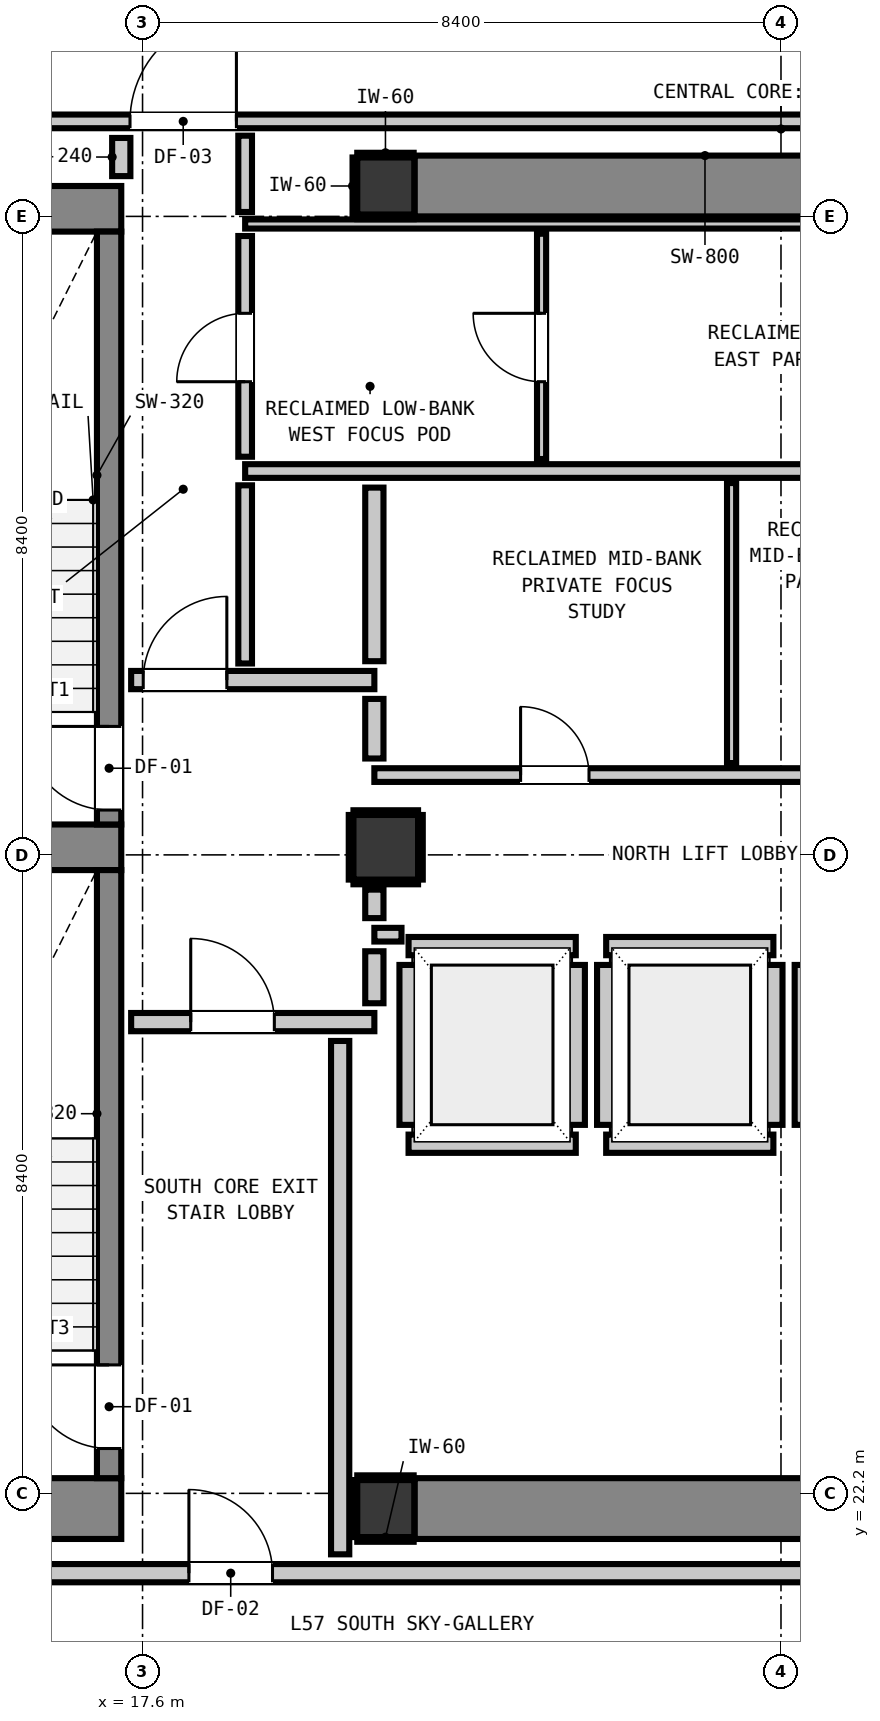
"""IFC4 building model, lengths in metres.
Left out: names, types, materials, properties, quantities, classifications, styles, units other than length and angle.
Written with IfcOpenShell. Run it as: python <this file> out.ifc"""

import sys

from ifc_helpers import new_model, si_unit, direction, frame, frame_2d, origin, origin_2d, place, context, subcontext, project, spatial, rectangle, extrude, element, fill, save


model = new_model("IFC4")
c1 = context("Model", 3, precision=1e-05, world=origin(), true_north=direction((0.0, 1.0)))
c2 = subcontext(c1, "Body", "Model", "MODEL_VIEW")
j1 = project(units=[si_unit("LENGTHUNIT", "METRE"), si_unit("PLANEANGLEUNIT", "RADIAN")], contexts=[c1])
p1 = place(None, origin())
s1 = spatial("IfcSite", under=j1, at=p1, CompositionType="ELEMENT")
p2 = place(p1, origin())
s2 = spatial("IfcBuilding", under=s1, at=p2, CompositionType="ELEMENT")
p3 = place(p2, frame((0.0, 0.0, 196.8)))
s3 = spatial("IfcBuildingStorey", under=s2, at=p3, CompositionType="ELEMENT", Elevation=196.8)
for number, where, z_axis, x_axis in (
    (1, (20.8, 22.0, 0.0), (0.0, 0.0, 1.0), (1.0, 0.0, 0.0)),
    (2, (20.8, 39.4, 0.0), (0.0, 0.0, 1.0), (1.0, 0.0, 0.0)),
):
    element("IfcColumn", number, at=place(p3, frame(where, z_axis=z_axis, x_axis=x_axis)), inside=s3, PredefinedType="COLUMN", context=c2, shape_type="SweptSolid", body=[
        extrude(rectangle(XDim=0.75, YDim=0.75, at=origin_2d()), origin(), (0.0, 0.0, 1.0), 3.32),
    ])
p4 = place(p3, frame((13.24, 22.0, 0.0), z_axis=(0.0, 0.0, 1.0), x_axis=(1.0, 0.0, 0.0)))
e3 = element("IfcWall", 3, at=p4, inside=s3, PredefinedType="SHEAR", context=c2, shape_type="SweptSolid", body=[
    extrude(rectangle(XDim=4.08, YDim=0.8, at=frame_2d((2.04, 0.0))), origin(), (0.0, 0.0, 1.0), 3.32),
])
p5 = place(p3, frame((13.24, 39.1, 0.0), z_axis=(0.0, 0.0, 1.0), x_axis=(1.0, 0.0, 0.0)))
e4 = element("IfcWall", 4, at=p5, inside=s3, PredefinedType="SHEAR", context=c2, shape_type="SweptSolid", body=[
    extrude(rectangle(XDim=4.08, YDim=0.6, at=frame_2d((2.04, 0.0))), origin(), (0.0, 0.0, 1.0), 3.32),
])
p6 = place(p3, frame((13.78, 30.7, 0.0), z_axis=(0.0, 0.0, 1.0), x_axis=(1.0, 0.0, 0.0)))
e5 = element("IfcWall", 5, at=p6, inside=s3, PredefinedType="SHEAR", context=c2, shape_type="SweptSolid", body=[
    extrude(rectangle(XDim=3.54, YDim=0.6, at=frame_2d((1.77, 0.0))), origin(), (0.0, 0.0, 1.0), 3.32),
])
for number, where, z_axis, x_axis in (
    (6, (21.18, 22.0, 0.0), (0.0, 0.0, 1.0), (1.0, 0.0, 0.0)),
    (7, (21.18, 39.4, 0.0), (0.0, 0.0, 1.0), (1.0, 0.0, 0.0)),
):
    element("IfcWall", number, at=place(p3, frame(where, z_axis=z_axis, x_axis=x_axis)), inside=s3, PredefinedType="SHEAR", context=c2, shape_type="SweptSolid", body=[
        extrude(rectangle(XDim=7.64, YDim=0.8, at=frame_2d((3.82, 0.0))), origin(), (0.0, 0.0, 1.0), 3.32),
    ])
p7 = place(p3, frame((17.16, 31.0, 0.0), z_axis=(0.0, 0.0, 1.0), x_axis=(0.0, 1.0, 0.0)))
e8 = element("IfcWall", 8, at=p7, inside=s3, PredefinedType="SHEAR", context=c2, shape_type="SweptSolid", body=[
    extrude(rectangle(XDim=7.8, YDim=0.32, at=frame_2d((3.9, 0.0))), origin(), (0.0, 0.0, 1.0), 3.32),
])
p8 = place(p7, frame((0.19, 0.0, 0.0)))
e9 = element("IfcOpeningElement", 9, at=p8, cuts=e8, PredefinedType="OPENING", context=c2, shape_type="SweptSolid", body=[
    extrude(rectangle(XDim=1.1, YDim=2.15, at=frame_2d((0.55, 1.075))), frame((0.0, 0.17, 0.0), z_axis=(0.0, -1.0, 0.0), x_axis=(1.0, 0.0, 0.0)), (0.0, 0.0, 1.0), 0.34),
])
p9 = place(p3, frame((17.16, 22.4, 0.0), z_axis=(0.0, 0.0, 1.0), x_axis=(0.0, 1.0, 0.0)))
e10 = element("IfcWall", 10, at=p9, inside=s3, PredefinedType="SHEAR", context=c2, shape_type="SweptSolid", body=[
    extrude(rectangle(XDim=8.0, YDim=0.32, at=frame_2d((4.0, 0.0))), origin(), (0.0, 0.0, 1.0), 3.32),
])
p10 = place(p9, frame((0.39, 0.0, 0.0)))
e11 = element("IfcOpeningElement", 11, at=p10, cuts=e10, PredefinedType="OPENING", context=c2, shape_type="SweptSolid", body=[
    extrude(rectangle(XDim=1.1, YDim=2.15, at=frame_2d((0.55, 1.075))), frame((0.0, 0.17, 0.0), z_axis=(0.0, -1.0, 0.0), x_axis=(1.0, 0.0, 0.0)), (0.0, 0.0, 1.0), 0.34),
])
p11 = place(p3, frame((20.8, 30.7, 0.0), z_axis=(0.0, 0.0, 1.0), x_axis=(1.0, 0.0, 0.0)))
e12 = element("IfcColumn", 12, at=p11, inside=s3, PredefinedType="COLUMN", context=c2, shape_type="SweptSolid", body=[
    extrude(rectangle(XDim=0.85, YDim=0.85, at=origin_2d()), origin(), (0.0, 0.0, 1.0), 3.32),
])
for number, where, z_axis, x_axis in (
    (13, (21.1, 26.8, 0.0), (0.0, 0.0, 1.0), (1.0, 0.0, 0.0)),
    (14, (21.1, 29.4, 0.0), (0.0, 0.0, 1.0), (1.0, 0.0, 0.0)),
):
    element("IfcWall", number, at=place(p3, frame(where, z_axis=z_axis, x_axis=x_axis)), inside=s3, PredefinedType="PARTITIONING", context=c2, shape_type="SweptSolid", body=[
        extrude(rectangle(XDim=2.2, YDim=0.24, at=frame_2d((1.1, 0.0))), origin(), (0.0, 0.0, 1.0), 3.1),
    ])
p12 = place(p3, frame((21.1, 27.048, 0.0), z_axis=(0.0, 0.0, 1.0), x_axis=(0.0, 1.0, 0.0)))
e15 = element("IfcWall", 15, at=p12, inside=s3, PredefinedType="PARTITIONING", context=c2, shape_type="SweptSolid", body=[
    extrude(rectangle(XDim=2.104, YDim=0.24, at=frame_2d((1.052, 0.0))), origin(), (0.0, 0.0, 1.0), 2.335),
])
p13 = place(p3, frame((23.3, 27.048, 0.0), z_axis=(0.0, 0.0, 1.0), x_axis=(0.0, 1.0, 0.0)))
e16 = element("IfcWall", 16, at=p13, inside=s3, PredefinedType="PARTITIONING", context=c2, shape_type="SweptSolid", body=[
    extrude(rectangle(XDim=2.104, YDim=0.24, at=frame_2d((1.052, 0.0))), origin(), (0.0, 0.0, 1.0), 3.1),
])
for number, where, z_axis, x_axis in (
    (17, (23.7, 26.8, 0.0), (0.0, 0.0, 1.0), (1.0, 0.0, 0.0)),
    (18, (23.7, 29.4, 0.0), (0.0, 0.0, 1.0), (1.0, 0.0, 0.0)),
):
    element("IfcWall", number, at=place(p3, frame(where, z_axis=z_axis, x_axis=x_axis)), inside=s3, PredefinedType="PARTITIONING", context=c2, shape_type="SweptSolid", body=[
        extrude(rectangle(XDim=2.2, YDim=0.24, at=frame_2d((1.1, 0.0))), origin(), (0.0, 0.0, 1.0), 3.1),
    ])
for number, where, z_axis, x_axis in (
    (19, (23.7, 27.048, 0.0), (0.0, 0.0, 1.0), (0.0, 1.0, 0.0)),
    (20, (25.9, 27.048, 0.0), (0.0, 0.0, 1.0), (0.0, 1.0, 0.0)),
    (21, (26.3, 27.048, 0.0), (0.0, 0.0, 1.0), (0.0, 1.0, 0.0)),
):
    element("IfcWall", number, at=place(p3, frame(where, z_axis=z_axis, x_axis=x_axis)), inside=s3, PredefinedType="PARTITIONING", context=c2, shape_type="SweptSolid", body=[
        extrude(rectangle(XDim=2.104, YDim=0.24, at=frame_2d((1.052, 0.0))), origin(), (0.0, 0.0, 1.0), 3.1),
    ])
p14 = place(p3, frame((4.587, 21.15, 0.0), z_axis=(0.0, 0.0, 1.0), x_axis=(1.0, 0.0, 0.0)))
e22 = element("IfcWall", 22, at=p14, inside=s3, PredefinedType="PARTITIONING", context=c2, shape_type="SweptSolid", body=[
    extrude(rectangle(XDim=36.626, YDim=0.24, at=frame_2d((18.313, 0.0))), origin(), (0.0, 0.0, 1.0), 3.1),
])
p15 = place(p14, frame((13.623, 0.0, 0.0)))
e23 = element("IfcOpeningElement", 23, at=p15, cuts=e22, PredefinedType="OPENING", context=c2, shape_type="SweptSolid", body=[
    extrude(rectangle(XDim=1.1, YDim=2.15, at=frame_2d((0.55, 1.075))), frame((0.0, 0.13, 0.0), z_axis=(0.0, -1.0, 0.0), x_axis=(1.0, 0.0, 0.0)), (0.0, 0.0, 1.0), 0.26),
])
p16 = place(p14, frame((4.723, 0.0, 0.0)))
e24 = element("IfcOpeningElement", 24, at=p16, cuts=e22, PredefinedType="OPENING", context=c2, shape_type="SweptSolid", body=[
    extrude(rectangle(XDim=1.0, YDim=2.15, at=frame_2d((0.5, 1.075))), frame((0.0, 0.13, 0.0), z_axis=(0.0, -1.0, 0.0), x_axis=(1.0, 0.0, 0.0)), (0.0, 0.0, 1.0), 0.26),
])
p17 = place(p3, frame((17.45, 28.4, 0.0), z_axis=(0.0, 0.0, 1.0), x_axis=(1.0, 0.0, 0.0)))
e25 = element("IfcWall", 25, at=p17, inside=s3, PredefinedType="PARTITIONING", context=c2, shape_type="SweptSolid", body=[
    extrude(rectangle(XDim=3.2, YDim=0.24, at=frame_2d((1.6, 0.0))), origin(), (0.0, 0.0, 1.0), 3.1),
])
p18 = place(p17, frame((0.784, 0.0, 0.0)))
e26 = element("IfcOpeningElement", 26, at=p18, cuts=e25, PredefinedType="OPENING", context=c2, shape_type="SweptSolid", body=[
    extrude(rectangle(XDim=1.1, YDim=2.15, at=frame_2d((0.55, 1.075))), frame((0.0, 0.13, 0.0), z_axis=(0.0, -1.0, 0.0), x_axis=(1.0, 0.0, 0.0)), (0.0, 0.0, 1.0), 0.26),
])
p19 = place(p3, frame((17.45, 32.9, 0.0), z_axis=(0.0, 0.0, 1.0), x_axis=(1.0, 0.0, 0.0)))
e27 = element("IfcWall", 27, at=p19, inside=s3, PredefinedType="PARTITIONING", context=c2, shape_type="SweptSolid", body=[
    extrude(rectangle(XDim=3.2, YDim=0.24, at=frame_2d((1.6, 0.0))), origin(), (0.0, 0.0, 1.0), 3.1),
])
p20 = place(p19, frame((0.159, 0.0, 0.0)))
e28 = element("IfcOpeningElement", 28, at=p20, cuts=e27, PredefinedType="OPENING", context=c2, shape_type="SweptSolid", body=[
    extrude(rectangle(XDim=1.1, YDim=2.15, at=frame_2d((0.55, 1.075))), frame((0.0, 0.13, 0.0), z_axis=(0.0, -1.0, 0.0), x_axis=(1.0, 0.0, 0.0)), (0.0, 0.0, 1.0), 0.26),
])
p21 = place(p3, frame((20.65, 29.55, 0.0), z_axis=(0.0, 0.0, 1.0), x_axis=(1.0, 0.0, 0.0)))
e29 = element("IfcWall", 29, at=p21, inside=s3, PredefinedType="PARTITIONING", context=c2, shape_type="SweptSolid", body=[
    extrude(rectangle(XDim=0.357, YDim=0.18, at=frame_2d((0.179, 0.0))), origin(), (0.0, 0.0, 1.0), 3.1),
])
p22 = place(p3, frame((20.65, 31.65, 0.0), z_axis=(0.0, 0.0, 1.0), x_axis=(1.0, 0.0, 0.0)))
e30 = element("IfcWall", 30, at=p22, inside=s3, PredefinedType="PARTITIONING", context=c2, shape_type="SweptSolid", body=[
    extrude(rectangle(XDim=7.7, YDim=0.18, at=frame_2d((3.85, 0.0))), origin(), (0.0, 0.0, 1.0), 3.1),
])
p23 = place(p22, frame((1.924, 0.0, 0.0)))
e31 = element("IfcOpeningElement", 31, at=p23, cuts=e30, PredefinedType="OPENING", context=c2, shape_type="SweptSolid", body=[
    extrude(rectangle(XDim=0.9, YDim=2.1, at=frame_2d((0.45, 1.05))), frame((0.0, 0.1, 0.0), z_axis=(0.0, -1.0, 0.0), x_axis=(1.0, 0.0, 0.0)), (0.0, 0.0, 1.0), 0.2),
])
p24 = place(p3, frame((18.95, 35.65, 0.0), z_axis=(0.0, 0.0, 1.0), x_axis=(1.0, 0.0, 0.0)))
e32 = element("IfcWall", 32, at=p24, inside=s3, PredefinedType="PARTITIONING", context=c2, shape_type="SweptSolid", body=[
    extrude(rectangle(XDim=11.025, YDim=0.18, at=frame_2d((5.513, 0.0))), origin(), (0.0, 0.0, 1.0), 3.1),
])
p25 = place(p3, frame((13.012, 40.25, 0.0), z_axis=(0.0, 0.0, 1.0), x_axis=(1.0, 0.0, 0.0)))
e33 = element("IfcWall", 33, at=p25, inside=s3, PredefinedType="PARTITIONING", context=c2, shape_type="SweptSolid", body=[
    extrude(rectangle(XDim=28.201, YDim=0.18, at=frame_2d((14.101, 0.0))), origin(), (0.0, 0.0, 1.0), 3.1),
])
p26 = place(p25, frame((4.423, 0.0, 0.0)))
e34 = element("IfcOpeningElement", 34, at=p26, cuts=e33, PredefinedType="OPENING", context=c2, shape_type="SweptSolid", body=[
    extrude(rectangle(XDim=1.4, YDim=2.15, at=frame_2d((0.7, 1.075))), frame((0.0, 0.1, 0.0), z_axis=(0.0, -1.0, 0.0), x_axis=(1.0, 0.0, 0.0)), (0.0, 0.0, 1.0), 0.2),
])
p27 = place(p3, frame((18.95, 38.9, 0.0), z_axis=(0.0, 0.0, 1.0), x_axis=(1.0, 0.0, 0.0)))
e35 = element("IfcWall", 35, at=p27, inside=s3, PredefinedType="PARTITIONING", context=c2, shape_type="SweptSolid", body=[
    extrude(rectangle(XDim=11.025, YDim=0.12, at=frame_2d((5.513, 0.0))), origin(), (0.0, 0.0, 1.0), 3.1),
])
p28 = place(p3, frame((17.32, 39.53, 0.0), z_axis=(0.0, 0.0, 1.0), x_axis=(0.0, 1.0, 0.0)))
e36 = element("IfcWall", 36, at=p28, inside=s3, PredefinedType="PARTITIONING", context=c2, shape_type="SweptSolid", body=[
    extrude(rectangle(XDim=0.502, YDim=0.24, at=frame_2d((0.251, 0.0))), origin(), (0.0, 0.0, 1.0), 3.1),
])
p29 = place(p3, frame((20.2, 21.398, 0.0), z_axis=(0.0, 0.0, 1.0), x_axis=(0.0, 1.0, 0.0)))
e37 = element("IfcWall", 37, at=p29, inside=s3, PredefinedType="PARTITIONING", context=c2, shape_type="SweptSolid", body=[
    extrude(rectangle(XDim=6.754, YDim=0.24, at=frame_2d((3.377, 0.0))), origin(), (0.0, 0.0, 1.0), 3.1),
])
p30 = place(p3, frame((20.65, 28.648, 0.0), z_axis=(0.0, 0.0, 1.0), x_axis=(0.0, 1.0, 0.0)))
e38 = element("IfcWall", 38, at=p30, inside=s3, PredefinedType="PARTITIONING", context=c2, shape_type="SweptSolid", body=[
    extrude(rectangle(XDim=0.684, YDim=0.24, at=frame_2d((0.342, 0.0))), origin(), (0.0, 0.0, 1.0), 2.335),
])
p31 = place(p3, frame((20.65, 29.768, 0.0), z_axis=(0.0, 0.0, 1.0), x_axis=(0.0, 1.0, 0.0)))
e39 = element("IfcWall", 39, at=p31, inside=s3, PredefinedType="PARTITIONING", context=c2, shape_type="SweptSolid", body=[
    extrude(rectangle(XDim=0.375, YDim=0.24, at=frame_2d((0.188, 0.0))), origin(), (0.0, 0.0, 1.0), 2.335),
])
p32 = place(p3, frame((20.65, 31.868, 0.0), z_axis=(0.0, 0.0, 1.0), x_axis=(0.0, 1.0, 0.0)))
e40 = element("IfcWall", 40, at=p32, inside=s3, PredefinedType="PARTITIONING", context=c2, shape_type="SweptSolid", body=[
    extrude(rectangle(XDim=0.784, YDim=0.24, at=frame_2d((0.392, 0.0))), origin(), (0.0, 0.0, 1.0), 2.335),
])
p33 = place(p3, frame((20.65, 33.148, 0.0), z_axis=(0.0, 0.0, 1.0), x_axis=(0.0, 1.0, 0.0)))
e41 = element("IfcWall", 41, at=p33, inside=s3, PredefinedType="PARTITIONING", context=c2, shape_type="SweptSolid", body=[
    extrude(rectangle(XDim=2.284, YDim=0.24, at=frame_2d((1.142, 0.0))), origin(), (0.0, 0.0, 1.0), 2.335),
])
p34 = place(p3, frame((18.95, 33.118, 0.0), z_axis=(0.0, 0.0, 1.0), x_axis=(0.0, 1.0, 0.0)))
e42 = element("IfcWall", 42, at=p34, inside=s3, PredefinedType="PARTITIONING", context=c2, shape_type="SweptSolid", body=[
    extrude(rectangle(XDim=2.344, YDim=0.18, at=frame_2d((1.172, 0.0))), origin(), (0.0, 0.0, 1.0), 3.1),
])
p35 = place(p3, frame((18.95, 35.838, 0.0), z_axis=(0.0, 0.0, 1.0), x_axis=(0.0, 1.0, 0.0)))
e43 = element("IfcWall", 43, at=p35, inside=s3, PredefinedType="PARTITIONING", context=c2, shape_type="SweptSolid", body=[
    extrude(rectangle(XDim=2.904, YDim=0.18, at=frame_2d((1.452, 0.0))), origin(), (0.0, 0.0, 1.0), 3.1),
])
p36 = place(p35, frame((0.987, 0.0, 0.0)))
e44 = element("IfcOpeningElement", 44, at=p36, cuts=e43, PredefinedType="OPENING", context=c2, shape_type="SweptSolid", body=[
    extrude(rectangle(XDim=0.9, YDim=2.1, at=frame_2d((0.45, 1.05))), frame((0.0, 0.1, 0.0), z_axis=(0.0, -1.0, 0.0), x_axis=(1.0, 0.0, 0.0)), (0.0, 0.0, 1.0), 0.2),
])
p37 = place(p3, frame((18.95, 39.058, 0.0), z_axis=(0.0, 0.0, 1.0), x_axis=(0.0, 1.0, 0.0)))
e45 = element("IfcWall", 45, at=p37, inside=s3, PredefinedType="PARTITIONING", context=c2, shape_type="SweptSolid", body=[
    extrude(rectangle(XDim=1.004, YDim=0.18, at=frame_2d((0.502, 0.0))), origin(), (0.0, 0.0, 1.0), 3.1),
])
p38 = place(p3, frame((22.85, 35.808, 0.0), z_axis=(0.0, 0.0, 1.0), x_axis=(0.0, 1.0, 0.0)))
e46 = element("IfcWall", 46, at=p38, inside=s3, PredefinedType="PARTITIONING", context=c2, shape_type="SweptSolid", body=[
    extrude(rectangle(XDim=2.964, YDim=0.12, at=frame_2d((1.482, 0.0))), origin(), (0.0, 0.0, 1.0), 3.1),
])
p39 = place(p38, frame((1.017, 0.0, 0.0)))
e47 = element("IfcOpeningElement", 47, at=p39, cuts=e46, PredefinedType="OPENING", context=c2, shape_type="SweptSolid", body=[
    extrude(rectangle(XDim=0.9, YDim=2.1, at=frame_2d((0.45, 1.05))), frame((0.0, 0.07, 0.0), z_axis=(0.0, -1.0, 0.0), x_axis=(1.0, 0.0, 0.0)), (0.0, 0.0, 1.0), 0.14),
])
p40 = place(p3, frame((25.35, 31.808, 0.0), z_axis=(0.0, 0.0, 1.0), x_axis=(0.0, 1.0, 0.0)))
e48 = element("IfcWall", 48, at=p40, inside=s3, PredefinedType="PARTITIONING", context=c2, shape_type="SweptSolid", body=[
    extrude(rectangle(XDim=3.684, YDim=0.12, at=frame_2d((1.842, 0.0))), origin(), (0.0, 0.0, 1.0), 3.1),
])
for number, where, z_axis, x_axis in (
    (49, (20.425, 21.593, 0.0), (0.0, 0.0, 1.0), (1.0, 0.0, 0.0)),
    (50, (20.425, 22.407, 0.0), (0.0, 0.0, 1.0), (1.0, 0.0, 0.0)),
):
    element("IfcWall", number, at=place(p3, frame(where, z_axis=z_axis, x_axis=x_axis)), inside=s3, PredefinedType="PARTITIONING", context=c2, shape_type="SweptSolid", body=[
        extrude(rectangle(XDim=0.742, YDim=0.06, at=frame_2d((0.371, 0.0))), origin(), (0.0, 0.0, 1.0), 1.45),
    ])
p41 = place(p3, frame((20.393, 21.625, 0.0), z_axis=(0.0, 0.0, 1.0), x_axis=(0.0, 1.0, 0.0)))
e51 = element("IfcWall", 51, at=p41, inside=s3, PredefinedType="PARTITIONING", context=c2, shape_type="SweptSolid", body=[
    extrude(rectangle(XDim=0.75, YDim=0.06, at=frame_2d((0.375, 0.0))), origin(), (0.0, 0.0, 1.0), 1.45),
])
for number, where, z_axis, x_axis in (
    (52, (20.425, 38.993, 0.0), (0.0, 0.0, 1.0), (1.0, 0.0, 0.0)),
    (53, (20.425, 39.807, 0.0), (0.0, 0.0, 1.0), (1.0, 0.0, 0.0)),
):
    element("IfcWall", number, at=place(p3, frame(where, z_axis=z_axis, x_axis=x_axis)), inside=s3, PredefinedType="PARTITIONING", context=c2, shape_type="SweptSolid", body=[
        extrude(rectangle(XDim=0.742, YDim=0.06, at=frame_2d((0.371, 0.0))), origin(), (0.0, 0.0, 1.0), 1.45),
    ])
p42 = place(p3, frame((20.393, 39.025, 0.0), z_axis=(0.0, 0.0, 1.0), x_axis=(0.0, 1.0, 0.0)))
e54 = element("IfcWall", 54, at=p42, inside=s3, PredefinedType="PARTITIONING", context=c2, shape_type="SweptSolid", body=[
    extrude(rectangle(XDim=0.75, YDim=0.06, at=frame_2d((0.375, 0.0))), origin(), (0.0, 0.0, 1.0), 1.45),
])
for number, where, z_axis, x_axis in (
    (55, (20.375, 30.243, 0.0), (0.0, 0.0, 1.0), (1.0, 0.0, 0.0)),
    (56, (20.375, 31.157, 0.0), (0.0, 0.0, 1.0), (1.0, 0.0, 0.0)),
    (57, (20.343, 30.275, 0.0), (0.0, 0.0, 1.0), (0.0, 1.0, 0.0)),
    (58, (21.257, 30.275, 0.0), (0.0, 0.0, 1.0), (0.0, 1.0, 0.0)),
):
    element("IfcWall", number, at=place(p3, frame(where, z_axis=z_axis, x_axis=x_axis)), inside=s3, PredefinedType="PARTITIONING", context=c2, shape_type="SweptSolid", body=[
        extrude(rectangle(XDim=0.85, YDim=0.06, at=frame_2d((0.425, 0.0))), origin(), (0.0, 0.0, 1.0), 1.45),
    ])
p43 = place(p8, origin())
e59 = element("IfcDoor", 59, at=p43, inside=s3, OperationType="SINGLE_SWING_RIGHT", PredefinedType="DOOR", context=c2, shape_type="SweptSolid", body=[
    extrude(rectangle(XDim=1.1, YDim=2.15, at=frame_2d((0.55, 1.075))), frame((0.0, 0.025, 0.0), z_axis=(0.0, -1.0, 0.0), x_axis=(1.0, 0.0, 0.0)), (0.0, 0.0, 1.0), 0.05),
])
fill(e9, e59)
p44 = place(p10, origin())
e60 = element("IfcDoor", 60, at=p44, inside=s3, OperationType="SINGLE_SWING_RIGHT", PredefinedType="DOOR", context=c2, shape_type="SweptSolid", body=[
    extrude(rectangle(XDim=1.1, YDim=2.15, at=frame_2d((0.55, 1.075))), frame((0.0, 0.025, 0.0), z_axis=(0.0, -1.0, 0.0), x_axis=(1.0, 0.0, 0.0)), (0.0, 0.0, 1.0), 0.05),
])
fill(e11, e60)
p45 = place(p18, origin())
e61 = element("IfcDoor", 61, at=p45, inside=s3, OperationType="SINGLE_SWING_LEFT", PredefinedType="DOOR", context=c2, shape_type="SweptSolid", body=[
    extrude(rectangle(XDim=1.1, YDim=2.15, at=frame_2d((0.55, 1.075))), frame((0.0, 0.025, 0.0), z_axis=(0.0, -1.0, 0.0), x_axis=(1.0, 0.0, 0.0)), (0.0, 0.0, 1.0), 0.05),
])
fill(e26, e61)
p46 = place(p20, origin())
e62 = element("IfcDoor", 62, at=p46, inside=s3, OperationType="SINGLE_SWING_RIGHT", PredefinedType="DOOR", context=c2, shape_type="SweptSolid", body=[
    extrude(rectangle(XDim=1.1, YDim=2.15, at=frame_2d((0.55, 1.075))), frame((0.0, 0.025, 0.0), z_axis=(0.0, -1.0, 0.0), x_axis=(1.0, 0.0, 0.0)), (0.0, 0.0, 1.0), 0.05),
])
fill(e28, e62)
p47 = place(p15, origin())
e63 = element("IfcDoor", 63, at=p47, inside=s3, OperationType="SINGLE_SWING_LEFT", PredefinedType="DOOR", context=c2, shape_type="SweptSolid", body=[
    extrude(rectangle(XDim=1.1, YDim=2.15, at=frame_2d((0.55, 1.075))), frame((0.0, 0.025, 0.0), z_axis=(0.0, -1.0, 0.0), x_axis=(1.0, 0.0, 0.0)), (0.0, 0.0, 1.0), 0.05),
])
fill(e23, e63)
p48 = place(p26, origin())
e64 = element("IfcDoor", 64, at=p48, inside=s3, OperationType="SINGLE_SWING_RIGHT", PredefinedType="DOOR", context=c2, shape_type="SweptSolid", body=[
    extrude(rectangle(XDim=1.4, YDim=2.15, at=frame_2d((0.7, 1.075))), frame((0.0, 0.025, 0.0), z_axis=(0.0, -1.0, 0.0), x_axis=(1.0, 0.0, 0.0)), (0.0, 0.0, 1.0), 0.05),
])
fill(e34, e64)
p49 = place(p36, origin())
e65 = element("IfcDoor", 65, at=p49, inside=s3, OperationType="SINGLE_SWING_LEFT", PredefinedType="DOOR", context=c2, shape_type="SweptSolid", body=[
    extrude(rectangle(XDim=0.9, YDim=2.1, at=frame_2d((0.45, 1.05))), frame((0.0, 0.025, 0.0), z_axis=(0.0, -1.0, 0.0), x_axis=(1.0, 0.0, 0.0)), (0.0, 0.0, 1.0), 0.05),
])
fill(e44, e65)
p50 = place(p39, origin())
e66 = element("IfcDoor", 66, at=p50, inside=s3, OperationType="SINGLE_SWING_RIGHT", PredefinedType="DOOR", context=c2, shape_type="SweptSolid", body=[
    extrude(rectangle(XDim=0.9, YDim=2.1, at=frame_2d((0.45, 1.05))), frame((0.0, 0.025, 0.0), z_axis=(0.0, -1.0, 0.0), x_axis=(1.0, 0.0, 0.0)), (0.0, 0.0, 1.0), 0.05),
])
fill(e47, e66)
p51 = place(p23, origin())
e67 = element("IfcDoor", 67, at=p51, inside=s3, OperationType="SINGLE_SWING_LEFT", PredefinedType="DOOR", context=c2, shape_type="SweptSolid", body=[
    extrude(rectangle(XDim=0.9, YDim=2.1, at=frame_2d((0.45, 1.05))), frame((0.0, 0.025, 0.0), z_axis=(0.0, -1.0, 0.0), x_axis=(1.0, 0.0, 0.0)), (0.0, 0.0, 1.0), 0.05),
])
fill(e31, e67)
save(model, sys.argv[1])
